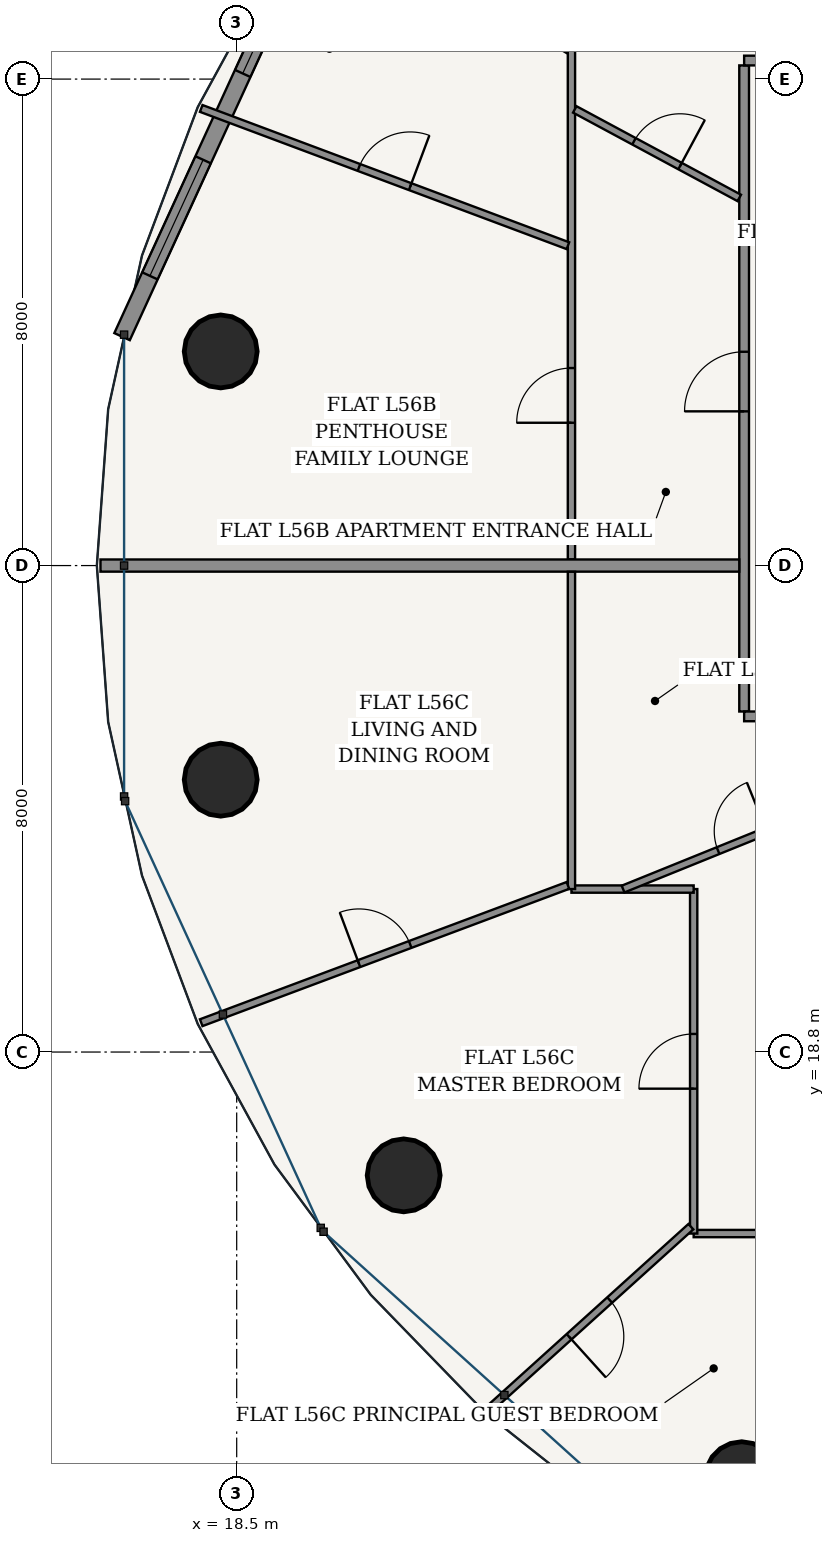
"""IFC4 building model, lengths in metres.
Left out: names, types, materials, properties, quantities, classifications, styles, units other than length and angle.
Written with IfcOpenShell. Run it as: python <this file> out.ifc"""

import sys

from ifc_helpers import new_model, si_unit, direction, frame, frame_2d, origin, origin_2d, place, context, subcontext, project, spatial, rectangle, hollow_circle, extrude, source, transform, mapped, element, fill, save


model = new_model("IFC4")
c1 = context("Model", 3, precision=1e-05, world=origin(), true_north=direction((-0.2419218956, 0.970295726276)))
c2 = subcontext(c1, "Body", "Model", "MODEL_VIEW")
j1 = project(units=[si_unit("LENGTHUNIT", "METRE"), si_unit("PLANEANGLEUNIT", "RADIAN")], contexts=[c1])
p1 = place(None, origin())
s1 = spatial("IfcSite", under=j1, at=p1, CompositionType="ELEMENT")
p2 = place(p1, origin())
s2 = spatial("IfcBuilding", under=s1, at=p2, CompositionType="ELEMENT")
p3 = place(p2, frame((0.0, 0.0, 213.4)))
s3 = spatial("IfcBuildingStorey", under=s2, at=p3, CompositionType="ELEMENT", Elevation=213.4)
for number, where, z_axis, x_axis in (
    (1, (18.237, 30.321, 0.0), (0.0, 0.0, 1.0), (1.0, 0.0, 0.0)),
    (2, (18.237, 23.279, 0.0), (0.0, 0.0, 1.0), (1.0, 0.0, 0.0)),
    (3, (21.246, 16.772, 0.0), (0.0, 0.0, 1.0), (1.0, 0.0, 0.0)),
    (4, (26.805, 11.792, 0.0), (0.0, 0.0, 1.0), (1.0, 0.0, 0.0)),
):
    element("IfcColumn", number, at=place(p3, frame(where, z_axis=z_axis, x_axis=x_axis)), inside=s3, PredefinedType="COLUMN", context=c2, shape_type="SweptSolid", body=[
        extrude(hollow_circle(Radius=0.6, WallThickness=0.038, at=origin_2d()), origin(), (0.0, 0.0, 1.0), 3.7),
    ])
p4 = place(p3, frame((19.932, 37.801, 0.0), z_axis=(0.0, 0.0, 1.0), x_axis=(-0.416717018135, -0.909036262641, 0.0)))
e5 = element("IfcWall", 5, at=p4, inside=s3, PredefinedType="SOLIDWALL", context=c2, shape_type="SweptSolid", body=[
    extrude(rectangle(XDim=7.96, YDim=0.28, at=frame_2d((3.98, 0.0))), origin(), (0.0, 0.0, 1.0), 3.435),
])
p5 = place(p4, frame((1.099, 0.0, 0.85)))
e6 = element("IfcOpeningElement", 6, at=p5, cuts=e5, PredefinedType="OPENING", context=c2, shape_type="SweptSolid", body=[
    extrude(rectangle(XDim=2.1, YDim=1.95, at=frame_2d((1.05, 0.975))), frame((0.0, 0.15, 0.0), z_axis=(0.0, -1.0, 0.0), x_axis=(1.0, 0.0, 0.0)), (0.0, 0.0, 1.0), 0.3),
])
p6 = place(p4, frame((4.761, 0.0, 0.85)))
e7 = element("IfcOpeningElement", 7, at=p6, cuts=e5, PredefinedType="OPENING", context=c2, shape_type="SweptSolid", body=[
    extrude(rectangle(XDim=2.1, YDim=1.95, at=frame_2d((1.05, 0.975))), frame((0.0, 0.15, 0.0), z_axis=(0.0, -1.0, 0.0), x_axis=(1.0, 0.0, 0.0)), (0.0, 0.0, 1.0), 0.3),
])
p7 = place(p3, frame((26.845, 24.4, 0.0), z_axis=(0.0, 0.0, 1.0), x_axis=(0.0, 1.0, 0.0)))
e8 = element("IfcWall", 8, at=p7, inside=s3, PredefinedType="PARTITIONING", context=c2, shape_type="SweptSolid", body=[
    extrude(rectangle(XDim=10.625, YDim=0.16, at=frame_2d((5.312, 0.0))), origin(), (0.0, 0.0, 1.0), 2.951),
])
p8 = place(p7, frame((4.936, 0.0, 0.0)))
e9 = element("IfcOpeningElement", 9, at=p8, cuts=e8, PredefinedType="OPENING", context=c2, shape_type="SweptSolid", body=[
    extrude(rectangle(XDim=0.98, YDim=2.2, at=frame_2d((0.49, 1.1))), frame((0.0, 0.09, 0.0), z_axis=(0.0, -1.0, 0.0), x_axis=(1.0, 0.0, 0.0)), (0.0, 0.0, 1.0), 0.18),
])
for number, where, z_axis, x_axis in (
    (10, (26.845, 35.105, 0.0), (0.0, 0.0, 1.0), (1.0, 0.0, 0.0)),
    (11, (26.845, 24.32, 0.0), (0.0, 0.0, 1.0), (1.0, 0.0, 0.0)),
):
    element("IfcWall", number, at=place(p3, frame(where, z_axis=z_axis, x_axis=x_axis)), inside=s3, PredefinedType="PARTITIONING", context=c2, shape_type="SweptSolid", body=[
        extrude(rectangle(XDim=1.93, YDim=0.16, at=frame_2d((0.965, 0.0))), origin(), (0.0, 0.0, 1.0), 3.435),
    ])
p9 = place(p3, frame((24.005, 26.902, 0.0), z_axis=(0.0, 0.0, 1.0), x_axis=(0.0, 1.0, 0.0)))
e12 = element("IfcWall", 12, at=p9, inside=s3, PredefinedType="PARTITIONING", context=c2, shape_type="SweptSolid", body=[
    extrude(rectangle(XDim=11.043, YDim=0.12, at=frame_2d((5.521, 0.0))), origin(), (0.0, 0.0, 1.0), 2.951),
])
p10 = place(p9, frame((2.246, 0.0, 0.0)))
e13 = element("IfcOpeningElement", 13, at=p10, cuts=e12, PredefinedType="OPENING", context=c2, shape_type="SweptSolid", body=[
    extrude(rectangle(XDim=0.9, YDim=2.15, at=frame_2d((0.45, 1.075))), frame((0.0, 0.07, 0.0), z_axis=(0.0, -1.0, 0.0), x_axis=(1.0, 0.0, 0.0)), (0.0, 0.0, 1.0), 0.14),
])
p11 = place(p3, frame((23.952, 35.282, 0.0), z_axis=(0.0, 0.0, 1.0), x_axis=(-0.856051317976, 0.516890840499, 0.0)))
e14 = element("IfcWall", 14, at=p11, inside=s3, PredefinedType="PARTITIONING", context=c2, shape_type="SweptSolid", body=[
    extrude(rectangle(XDim=4.658, YDim=0.12, at=frame_2d((2.329, 0.0))), origin(), (0.0, 0.0, 1.0), 2.951),
])
p12 = place(p11, frame((0.872, 0.0, 0.0)))
e15 = element("IfcOpeningElement", 15, at=p12, cuts=e14, PredefinedType="OPENING", context=c2, shape_type="SweptSolid", body=[
    extrude(rectangle(XDim=0.9, YDim=2.15, at=frame_2d((0.45, 1.075))), frame((0.0, 0.07, 0.0), z_axis=(0.0, -1.0, 0.0), x_axis=(1.0, 0.0, 0.0)), (0.0, 0.0, 1.0), 0.14),
])
p13 = place(p3, frame((23.947, 32.06, 0.0), z_axis=(0.0, 0.0, 1.0), x_axis=(-0.936547148815, 0.350541635255, 0.0)))
e16 = element("IfcWall", 16, at=p13, inside=s3, PredefinedType="PARTITIONING", context=c2, shape_type="SweptSolid", body=[
    extrude(rectangle(XDim=6.439, YDim=0.12, at=frame_2d((3.219, 0.0))), origin(), (0.0, 0.0, 1.0), 2.951),
])
p14 = place(p13, frame((2.769, 0.0, 0.0)))
e17 = element("IfcOpeningElement", 17, at=p14, cuts=e16, PredefinedType="OPENING", context=c2, shape_type="SweptSolid", body=[
    extrude(rectangle(XDim=0.9, YDim=2.15, at=frame_2d((0.45, 1.075))), frame((0.0, 0.07, 0.0), z_axis=(0.0, -1.0, 0.0), x_axis=(1.0, 0.0, 0.0)), (0.0, 0.0, 1.0), 0.14),
])
p15 = place(p3, frame((26.765, 32.845, 0.0), z_axis=(0.0, 0.0, 1.0), x_axis=(-0.88059355453, 0.473872336943, 0.0)))
e18 = element("IfcWall", 18, at=p15, inside=s3, PredefinedType="PARTITIONING", context=c2, shape_type="SweptSolid", body=[
    extrude(rectangle(XDim=3.072, YDim=0.12, at=frame_2d((1.536, 0.0))), origin(), (0.0, 0.0, 1.0), 3.11),
])
p16 = place(p15, frame((1.106, 0.0, 0.0)))
e19 = element("IfcOpeningElement", 19, at=p16, cuts=e18, PredefinedType="OPENING", context=c2, shape_type="SweptSolid", body=[
    extrude(rectangle(XDim=0.86, YDim=2.15, at=frame_2d((0.43, 1.075))), frame((0.0, 0.07, 0.0), z_axis=(0.0, -1.0, 0.0), x_axis=(1.0, 0.0, 0.0)), (0.0, 0.0, 1.0), 0.14),
])
p17 = place(p3, frame((26.765, 26.8, 0.0), z_axis=(0.0, 0.0, 1.0), x_axis=(-1.0, 0.0, 0.0)))
e20 = element("IfcWall", 20, at=p17, inside=s3, PredefinedType="PARTITIONING", context=c2, shape_type="SweptSolid", body=[
    extrude(rectangle(XDim=10.505, YDim=0.2, at=frame_2d((5.252, 0.0))), origin(), (0.0, 0.0, 1.0), 2.951),
])
p18 = place(p3, frame((31.48, 15.815, 0.0), z_axis=(0.0, 0.0, 1.0), x_axis=(-1.0, 0.0, 0.0)))
e21 = element("IfcWall", 21, at=p18, inside=s3, PredefinedType="PARTITIONING", context=c2, shape_type="SweptSolid", body=[
    extrude(rectangle(XDim=5.465, YDim=0.12, at=frame_2d((2.732, 0.0))), origin(), (0.0, 0.0, 1.0), 2.951),
])
p19 = place(p3, frame((26.015, 15.815, 0.0), z_axis=(0.0, 0.0, 1.0), x_axis=(0.0, 1.0, 0.0)))
e22 = element("IfcWall", 22, at=p19, inside=s3, PredefinedType="PARTITIONING", context=c2, shape_type="SweptSolid", body=[
    extrude(rectangle(XDim=5.665, YDim=0.12, at=frame_2d((2.833, 0.0))), origin(), (0.0, 0.0, 1.0), 2.951),
])
p20 = place(p19, frame((2.383, 0.0, 0.0)))
e23 = element("IfcOpeningElement", 23, at=p20, cuts=e22, PredefinedType="OPENING", context=c2, shape_type="SweptSolid", body=[
    extrude(rectangle(XDim=0.9, YDim=2.15, at=frame_2d((0.45, 1.075))), frame((0.0, 0.07, 0.0), z_axis=(0.0, -1.0, 0.0), x_axis=(1.0, 0.0, 0.0)), (0.0, 0.0, 1.0), 0.14),
])
p21 = place(p3, frame((26.015, 21.48, 0.0), z_axis=(0.0, 0.0, 1.0), x_axis=(-1.0, 0.0, 0.0)))
e24 = element("IfcWall", 24, at=p21, inside=s3, PredefinedType="PARTITIONING", context=c2, shape_type="SweptSolid", body=[
    extrude(rectangle(XDim=2.01, YDim=0.12, at=frame_2d((1.005, 0.0))), origin(), (0.0, 0.0, 1.0), 3.11),
])
p22 = place(p3, frame((24.005, 21.48, 0.0), z_axis=(0.0, 0.0, 1.0), x_axis=(0.0, 1.0, 0.0)))
e25 = element("IfcWall", 25, at=p22, inside=s3, PredefinedType="PARTITIONING", context=c2, shape_type="SweptSolid", body=[
    extrude(rectangle(XDim=5.218, YDim=0.12, at=frame_2d((2.609, 0.0))), origin(), (0.0, 0.0, 1.0), 2.951),
])
p23 = place(p3, frame((23.947, 21.54, 0.0), z_axis=(0.0, 0.0, 1.0), x_axis=(-0.936534700322, -0.350574892274, 0.0)))
e26 = element("IfcWall", 26, at=p23, inside=s3, PredefinedType="PARTITIONING", context=c2, shape_type="SweptSolid", body=[
    extrude(rectangle(XDim=6.439, YDim=0.12, at=frame_2d((3.219, 0.0))), origin(), (0.0, 0.0, 1.0), 2.951),
])
p24 = place(p23, frame((2.769, 0.0, 0.0)))
e27 = element("IfcOpeningElement", 27, at=p24, cuts=e26, PredefinedType="OPENING", context=c2, shape_type="SweptSolid", body=[
    extrude(rectangle(XDim=0.9, YDim=2.15, at=frame_2d((0.45, 1.075))), frame((0.0, 0.07, 0.0), z_axis=(0.0, -1.0, 0.0), x_axis=(1.0, 0.0, 0.0)), (0.0, 0.0, 1.0), 0.14),
])
p25 = place(p3, frame((25.969, 15.928, 0.0), z_axis=(0.0, 0.0, 1.0), x_axis=(-0.741935446671, -0.670471321514, 0.0)))
e28 = element("IfcWall", 28, at=p25, inside=s3, PredefinedType="PARTITIONING", context=c2, shape_type="SweptSolid", body=[
    extrude(rectangle(XDim=4.499, YDim=0.12, at=frame_2d((2.25, 0.0))), origin(), (0.0, 0.0, 1.0), 2.951),
])
p26 = place(p25, frame((1.8, 0.0, 0.0)))
e29 = element("IfcOpeningElement", 29, at=p26, cuts=e28, PredefinedType="OPENING", context=c2, shape_type="SweptSolid", body=[
    extrude(rectangle(XDim=0.9, YDim=2.15, at=frame_2d((0.45, 1.075))), frame((0.0, 0.07, 0.0), z_axis=(0.0, -1.0, 0.0), x_axis=(1.0, 0.0, 0.0)), (0.0, 0.0, 1.0), 0.14),
])
p27 = place(p3, frame((29.841, 15.765, 0.0), z_axis=(0.0, 0.0, 1.0), x_axis=(-0.594535821787, -0.804069124275, 0.0)))
e30 = element("IfcWall", 30, at=p27, inside=s3, PredefinedType="PARTITIONING", context=c2, shape_type="SweptSolid", body=[
    extrude(rectangle(XDim=6.543, YDim=0.12, at=frame_2d((3.272, 0.0))), origin(), (0.0, 0.0, 1.0), 2.951),
])
p28 = place(p27, frame((1.814, 0.0, 0.0)))
e31 = element("IfcOpeningElement", 31, at=p28, cuts=e30, PredefinedType="OPENING", context=c2, shape_type="SweptSolid", body=[
    extrude(rectangle(XDim=0.9, YDim=2.15, at=frame_2d((0.45, 1.075))), frame((0.0, 0.07, 0.0), z_axis=(0.0, -1.0, 0.0), x_axis=(1.0, 0.0, 0.0)), (0.0, 0.0, 1.0), 0.14),
])
p29 = place(p3, frame((28.775, 23.067, 0.0), z_axis=(0.0, 0.0, 1.0), x_axis=(-0.926976443277, -0.375119545757, 0.0)))
e32 = element("IfcWall", 32, at=p29, inside=s3, PredefinedType="PARTITIONING", context=c2, shape_type="SweptSolid", body=[
    extrude(rectangle(XDim=4.23, YDim=0.12, at=frame_2d((2.115, 0.0))), origin(), (0.0, 0.0, 1.0), 3.435),
])
p30 = place(p29, frame((1.685, 0.0, 0.0)))
e33 = element("IfcOpeningElement", 33, at=p30, cuts=e32, PredefinedType="OPENING", context=c2, shape_type="SweptSolid", body=[
    extrude(rectangle(XDim=0.86, YDim=2.15, at=frame_2d((0.43, 1.075))), frame((0.0, 0.07, 0.0), z_axis=(0.0, -1.0, 0.0), x_axis=(1.0, 0.0, 0.0)), (0.0, 0.0, 1.0), 0.14),
])
m1 = source(origin(), c2, "Body", "SweptSolid", [
    extrude(rectangle(XDim=2.1, YDim=1.95, at=frame_2d((1.05, 0.975))), frame((0.0, 0.03, 0.0), z_axis=(0.0, -1.0, 0.0), x_axis=(1.0, 0.0, 0.0)), (0.0, 0.0, 1.0), 0.06),
])
p31 = place(p5, origin())
e34 = element("IfcWindow", 34, at=p31, inside=s3, PartitioningType="SINGLE_PANEL", PredefinedType="WINDOW", context=c2, shape_type="MappedRepresentation", body=[
    mapped(m1, transform((0.0, 0.0, 0.0), scale=1.0)),
])
fill(e6, e34)
p32 = place(p6, origin())
e35 = element("IfcWindow", 35, at=p32, inside=s3, PartitioningType="SINGLE_PANEL", PredefinedType="WINDOW", context=c2, shape_type="MappedRepresentation", body=[
    mapped(m1, transform((0.0, 0.0, 0.0), scale=1.0)),
])
fill(e7, e35)
m2 = source(origin(), c2, "Body", "SweptSolid", [
    extrude(rectangle(XDim=0.98, YDim=2.2, at=frame_2d((0.49, 1.1))), frame((0.0, 0.025, 0.0), z_axis=(0.0, -1.0, 0.0), x_axis=(1.0, 0.0, 0.0)), (0.0, 0.0, 1.0), 0.05),
])
p33 = place(p8, origin())
e36 = element("IfcDoor", 36, at=p33, inside=s3, OperationType="SINGLE_SWING_LEFT", PredefinedType="DOOR", context=c2, shape_type="MappedRepresentation", body=[
    mapped(m2, transform((0.0, 0.0, 0.0), scale=1.0)),
])
fill(e9, e36)
m3 = source(origin(), c2, "Body", "SweptSolid", [
    extrude(rectangle(XDim=0.86, YDim=2.15, at=frame_2d((0.43, 1.075))), frame((0.0, 0.025, 0.0), z_axis=(0.0, -1.0, 0.0), x_axis=(1.0, 0.0, 0.0)), (0.0, 0.0, 1.0), 0.05),
])
p34 = place(p16, frame((0.86, 0.0, 0.0), z_axis=(0.0, 0.0, 1.0), x_axis=(-1.0, 0.0, 0.0)))
e37 = element("IfcDoor", 37, at=p34, inside=s3, OperationType="SINGLE_SWING_RIGHT", PredefinedType="DOOR", context=c2, shape_type="MappedRepresentation", body=[
    mapped(m3, transform((0.0, 0.0, 0.0), scale=1.0)),
])
fill(e19, e37)
m4 = source(origin(), c2, "Body", "SweptSolid", [
    extrude(rectangle(XDim=0.9, YDim=2.15, at=frame_2d((0.45, 1.075))), frame((0.0, 0.025, 0.0), z_axis=(0.0, -1.0, 0.0), x_axis=(1.0, 0.0, 0.0)), (0.0, 0.0, 1.0), 0.05),
])
p35 = place(p10, origin())
e38 = element("IfcDoor", 38, at=p35, inside=s3, OperationType="SINGLE_SWING_LEFT", PredefinedType="DOOR", context=c2, shape_type="MappedRepresentation", body=[
    mapped(m4, transform((0.0, 0.0, 0.0), scale=1.0)),
])
fill(e13, e38)
p36 = place(p14, frame((0.9, 0.0, 0.0), z_axis=(0.0, 0.0, 1.0), x_axis=(-1.0, 0.0, 0.0)))
e39 = element("IfcDoor", 39, at=p36, inside=s3, OperationType="SINGLE_SWING_RIGHT", PredefinedType="DOOR", context=c2, shape_type="MappedRepresentation", body=[
    mapped(m4, transform((0.0, 0.0, 0.0), scale=1.0)),
])
fill(e17, e39)
p37 = place(p20, origin())
e40 = element("IfcDoor", 40, at=p37, inside=s3, OperationType="SINGLE_SWING_LEFT", PredefinedType="DOOR", context=c2, shape_type="MappedRepresentation", body=[
    mapped(m4, transform((0.0, 0.0, 0.0), scale=1.0)),
])
fill(e23, e40)
p38 = place(p26, origin())
e41 = element("IfcDoor", 41, at=p38, inside=s3, OperationType="SINGLE_SWING_RIGHT", PredefinedType="DOOR", context=c2, shape_type="MappedRepresentation", body=[
    mapped(m4, transform((0.0, 0.0, 0.0), scale=1.0)),
])
fill(e29, e41)
p39 = place(p30, frame((0.86, 0.0, 0.0), z_axis=(0.0, 0.0, 1.0), x_axis=(-1.0, 0.0, 0.0)))
e42 = element("IfcDoor", 42, at=p39, inside=s3, OperationType="SINGLE_SWING_RIGHT", PredefinedType="DOOR", context=c2, shape_type="MappedRepresentation", body=[
    mapped(m3, transform((0.0, 0.0, 0.0), scale=1.0)),
])
fill(e33, e42)
p40 = place(p24, frame((0.9, 0.0, 0.0), z_axis=(0.0, 0.0, 1.0), x_axis=(-1.0, 0.0, 0.0)))
e43 = element("IfcDoor", 43, at=p40, inside=s3, OperationType="SINGLE_SWING_LEFT", PredefinedType="DOOR", context=c2, shape_type="MappedRepresentation", body=[
    mapped(m4, transform((0.0, 0.0, 0.0), scale=1.0)),
])
fill(e27, e43)
save(model, sys.argv[1])
